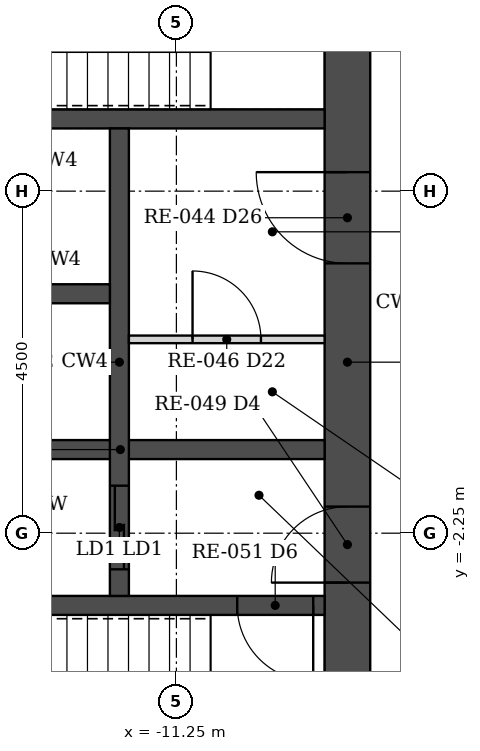
"""IFC4 building model, lengths in metres.
Left out: names, types, materials, properties, quantities, classifications, styles, units other than length and angle.
Written with IfcOpenShell. Run it as: python <this file> out.ifc"""

import sys

from ifc_helpers import new_model, si_unit, direction, frame, frame_2d, origin, place, context, subcontext, project, spatial, rectangle, extrude, element, fill, save


model = new_model("IFC4")
c1 = context("Model", 3, precision=1e-05, world=origin(), true_north=direction((0.0, 1.0)))
c2 = subcontext(c1, "Body", "Model", "MODEL_VIEW")
j1 = project(units=[si_unit("LENGTHUNIT", "METRE"), si_unit("PLANEANGLEUNIT", "RADIAN")], contexts=[c1])
p1 = place(None, origin())
s1 = spatial("IfcSite", under=j1, at=p1, CompositionType="ELEMENT")
p2 = place(p1, origin())
s2 = spatial("IfcBuilding", under=s1, at=p2, CompositionType="ELEMENT")
p3 = place(p2, frame((0.0, 0.0, 68.5)))
s3 = spatial("IfcBuildingStorey", under=s2, at=p3, CompositionType="ELEMENT", Elevation=68.5)
p4 = place(p3, frame((-9.0, -6.45, 0.0), z_axis=(0.0, 0.0, 1.0), x_axis=(0.0, 1.0, 0.0)))
e1 = element("IfcWall", 1, at=p4, inside=s3, PredefinedType="SHEAR", context=c2, shape_type="SweptSolid", body=[
    extrude(rectangle(XDim=12.9, YDim=0.6, at=frame_2d((6.45, 0.0))), origin(), (0.0, 0.0, 1.0), 3.5),
])
p5 = place(p4, frame((3.55, 0.0, 0.0)))
e2 = element("IfcOpeningElement", 2, at=p5, cuts=e1, PredefinedType="OPENING", context=c2, shape_type="SweptSolid", body=[
    extrude(rectangle(XDim=1.0, YDim=2.1, at=frame_2d((0.5, 1.05))), frame((0.0, 0.31, 0.0), z_axis=(0.0, -1.0, 0.0), x_axis=(1.0, 0.0, 0.0)), (0.0, 0.0, 1.0), 0.62),
])
p6 = place(p4, frame((7.75, 0.0, 0.0)))
e3 = element("IfcOpeningElement", 3, at=p6, cuts=e1, PredefinedType="OPENING", context=c2, shape_type="SweptSolid", body=[
    extrude(rectangle(XDim=1.2, YDim=2.1, at=frame_2d((0.6, 1.05))), frame((0.0, 0.31, 0.0), z_axis=(0.0, -1.0, 0.0), x_axis=(1.0, 0.0, 0.0)), (0.0, 0.0, 1.0), 0.62),
])
p7 = place(p4, frame((10.85, 0.0, 0.0)))
e4 = element("IfcOpeningElement", 4, at=p7, cuts=e1, PredefinedType="OPENING", context=c2, shape_type="SweptSolid", body=[
    extrude(rectangle(XDim=1.0, YDim=2.1, at=frame_2d((0.5, 1.05))), frame((0.0, 0.31, 0.0), z_axis=(0.0, -1.0, 0.0), x_axis=(1.0, 0.0, 0.0)), (0.0, 0.0, 1.0), 0.62),
])
p8 = place(p3, frame((-9.3, -3.2, 0.0), z_axis=(0.0, 0.0, 1.0), x_axis=(-1.0, 0.0, 0.0)))
e5 = element("IfcWall", 5, at=p8, inside=s3, PredefinedType="SHEAR", context=c2, shape_type="SweptSolid", body=[
    extrude(rectangle(XDim=8.4, YDim=0.25, at=frame_2d((4.2, 0.0))), origin(), (0.0, 0.0, 1.0), 3.5),
])
p9 = place(p8, frame((0.15, 0.0, 0.0)))
e6 = element("IfcOpeningElement", 6, at=p9, cuts=e5, PredefinedType="OPENING", context=c2, shape_type="SweptSolid", body=[
    extrude(rectangle(XDim=1.0, YDim=2.1, at=frame_2d((0.5, 1.05))), frame((0.0, 0.135, 0.0), z_axis=(0.0, -1.0, 0.0), x_axis=(1.0, 0.0, 0.0)), (0.0, 0.0, 1.0), 0.27),
])
p10 = place(p3, frame((-9.3, 3.2, 0.0), z_axis=(0.0, 0.0, 1.0), x_axis=(-1.0, 0.0, 0.0)))
e7 = element("IfcWall", 7, at=p10, inside=s3, PredefinedType="SHEAR", context=c2, shape_type="SweptSolid", body=[
    extrude(rectangle(XDim=8.4, YDim=0.25, at=frame_2d((4.2, 0.0))), origin(), (0.0, 0.0, 1.0), 3.5),
])
p11 = place(p3, frame((-9.3, -1.15, 0.0), z_axis=(0.0, 0.0, 1.0), x_axis=(-1.0, 0.0, 0.0)))
e8 = element("IfcWall", 8, at=p11, inside=s3, PredefinedType="SHEAR", context=c2, shape_type="SweptSolid", body=[
    extrude(rectangle(XDim=5.375, YDim=0.25, at=frame_2d((2.688, 0.0))), origin(), (0.0, 0.0, 1.0), 3.5),
])
p12 = place(p3, frame((-12.0, -3.075, 0.0), z_axis=(0.0, 0.0, 1.0), x_axis=(0.0, 1.0, 0.0)))
e9 = element("IfcWall", 9, at=p12, inside=s3, PredefinedType="SHEAR", context=c2, shape_type="SweptSolid", body=[
    extrude(rectangle(XDim=6.15, YDim=0.25, at=frame_2d((3.075, 0.0))), origin(), (0.0, 0.0, 1.0), 3.5),
])
p13 = place(p12, frame((0.35, 0.0, 0.0)))
e10 = element("IfcOpeningElement", 10, at=p13, cuts=e9, PredefinedType="OPENING", context=c2, shape_type="SweptSolid", body=[
    extrude(rectangle(XDim=1.1, YDim=2.1, at=frame_2d((0.55, 1.05))), frame((0.0, 0.135, 0.0), z_axis=(0.0, -1.0, 0.0), x_axis=(1.0, 0.0, 0.0)), (0.0, 0.0, 1.0), 0.27),
])
p14 = place(p3, frame((-12.125, 0.9, 0.0), z_axis=(0.0, 0.0, 1.0), x_axis=(-1.0, 0.0, 0.0)))
e11 = element("IfcWall", 11, at=p14, inside=s3, PredefinedType="SHEAR", context=c2, shape_type="SweptSolid", body=[
    extrude(rectangle(XDim=2.55, YDim=0.25, at=frame_2d((1.275, 0.0))), origin(), (0.0, 0.0, 1.0), 3.5),
])
p15 = place(p3, frame((-11.875, 0.3, 0.0), z_axis=(0.0, 0.0, 1.0), x_axis=(1.0, 0.0, 0.0)))
e12 = element("IfcWall", 12, at=p15, inside=s3, PredefinedType="PARTITIONING", context=c2, shape_type="SweptSolid", body=[
    extrude(rectangle(XDim=2.575, YDim=0.1, at=frame_2d((1.288, 0.0))), origin(), (0.0, 0.0, 1.0), 2.373),
])
p16 = place(p15, frame((0.837, 0.0, 0.0)))
e13 = element("IfcOpeningElement", 13, at=p16, cuts=e12, PredefinedType="OPENING", context=c2, shape_type="SweptSolid", body=[
    extrude(rectangle(XDim=0.9, YDim=2.1, at=frame_2d((0.45, 1.05))), frame((0.0, 0.06, 0.0), z_axis=(0.0, -1.0, 0.0), x_axis=(1.0, 0.0, 0.0)), (0.0, 0.0, 1.0), 0.12),
])
p17 = place(p5, origin())
e14 = element("IfcDoor", 14, at=p17, inside=s3, OperationType="SINGLE_SWING_LEFT", PredefinedType="DOOR", context=c2, shape_type="SweptSolid", body=[
    extrude(rectangle(XDim=1.0, YDim=2.1, at=frame_2d((0.5, 1.05))), frame((0.0, 0.025, 0.0), z_axis=(0.0, -1.0, 0.0), x_axis=(1.0, 0.0, 0.0)), (0.0, 0.0, 1.0), 0.05),
])
fill(e2, e14)
p18 = place(p9, origin())
e15 = element("IfcDoor", 15, at=p18, inside=s3, OperationType="SINGLE_SWING_LEFT", PredefinedType="DOOR", context=c2, shape_type="SweptSolid", body=[
    extrude(rectangle(XDim=1.0, YDim=2.1, at=frame_2d((0.5, 1.05))), frame((0.0, 0.025, 0.0), z_axis=(0.0, -1.0, 0.0), x_axis=(1.0, 0.0, 0.0)), (0.0, 0.0, 1.0), 0.05),
])
fill(e6, e15)
p19 = place(p6, origin())
e16 = element("IfcDoor", 16, at=p19, inside=s3, OperationType="SINGLE_SWING_RIGHT", PredefinedType="DOOR", context=c2, shape_type="SweptSolid", body=[
    extrude(rectangle(XDim=1.2, YDim=2.1, at=frame_2d((0.6, 1.05))), frame((0.0, 0.025, 0.0), z_axis=(0.0, -1.0, 0.0), x_axis=(1.0, 0.0, 0.0)), (0.0, 0.0, 1.0), 0.05),
])
fill(e3, e16)
p20 = place(p16, origin())
e17 = element("IfcDoor", 17, at=p20, inside=s3, OperationType="SINGLE_SWING_LEFT", PredefinedType="DOOR", context=c2, shape_type="SweptSolid", body=[
    extrude(rectangle(XDim=0.9, YDim=2.1, at=frame_2d((0.45, 1.05))), frame((0.0, 0.025, 0.0), z_axis=(0.0, -1.0, 0.0), x_axis=(1.0, 0.0, 0.0)), (0.0, 0.0, 1.0), 0.05),
])
fill(e13, e17)
p21 = place(p13, origin())
e18 = element("IfcDoor", 18, at=p21, inside=s3, OperationType="DOUBLE_DOOR_SLIDING", PredefinedType="DOOR", context=c2, shape_type="SweptSolid", body=[
    extrude(rectangle(XDim=1.1, YDim=2.1, at=frame_2d((0.55, 1.05))), frame((0.0, 0.025, 0.0), z_axis=(0.0, -1.0, 0.0), x_axis=(1.0, 0.0, 0.0)), (0.0, 0.0, 1.0), 0.05),
])
fill(e10, e18)
save(model, sys.argv[1])
